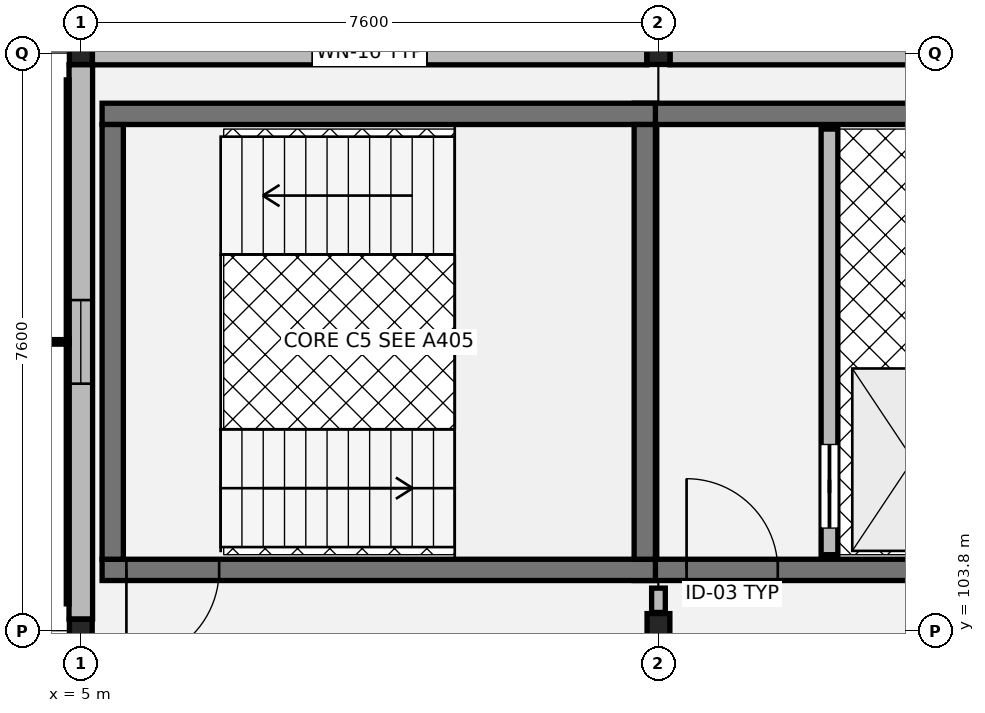
"""IFC4 building model, lengths in metres.
Left out: names, types, materials, properties, quantities, classifications, styles, units other than length and angle.
Written with IfcOpenShell. Run it as: python <this file> out.ifc"""

import sys

from ifc_helpers import new_model, si_unit, direction, frame, frame_2d, origin, origin_2d, place, context, subcontext, project, spatial, rectangle, hollow_rectangle, i_section, extrude, element, fill, save


model = new_model("IFC4")
c1 = context("Model", 3, precision=1e-05, world=origin(), true_north=direction((0.0, 1.0)))
c2 = subcontext(c1, "Body", "Model", "MODEL_VIEW")
j1 = project(units=[si_unit("LENGTHUNIT", "METRE"), si_unit("PLANEANGLEUNIT", "RADIAN")], contexts=[c1])
p1 = place(None, origin())
s1 = spatial("IfcSite", under=j1, at=p1, CompositionType="ELEMENT")
p2 = place(p1, origin())
s2 = spatial("IfcBuilding", under=s1, at=p2, CompositionType="ELEMENT")
p3 = place(p2, frame((0.0, 0.0, 5.1)))
s3 = spatial("IfcBuildingStorey", under=s2, at=p3, CompositionType="ELEMENT", Elevation=5.1)
for number, where, z_axis, x_axis in (
    (1, (5.0, 103.8, 0.0), (0.0, 0.0, 1.0), (1.0, 0.0, 0.0)),
    (2, (5.0, 111.4, 0.0), (0.0, 0.0, 1.0), (1.0, 0.0, 0.0)),
):
    element("IfcColumn", number, at=place(p3, frame(where, z_axis=z_axis, x_axis=x_axis)), inside=s3, PredefinedType="COLUMN", context=c2, shape_type="SweptSolid", body=[
        extrude(hollow_rectangle(XDim=0.3, YDim=0.3, WallThickness=0.012, at=origin_2d()), origin(), (0.0, 0.0, 1.0), 4.055),
    ])
p4 = place(p3, frame((12.6, 103.8, 0.0), z_axis=(0.0, 0.0, 1.0), x_axis=(1.0, 0.0, 0.0)))
e3 = element("IfcColumn", 3, at=p4, inside=s3, PredefinedType="COLUMN", context=c2, shape_type="SweptSolid", body=[
    extrude(i_section(OverallWidth=0.3, OverallDepth=0.45, WebThickness=0.014, FlangeThickness=0.026, at=origin_2d()), origin(), (0.0, 0.0, 1.0), 4.055),
])
p5 = place(p3, frame((12.6, 111.4, 0.0), z_axis=(0.0, 0.0, 1.0), x_axis=(1.0, 0.0, 0.0)))
e4 = element("IfcColumn", 4, at=p5, inside=s3, PredefinedType="COLUMN", context=c2, shape_type="SweptSolid", body=[
    extrude(hollow_rectangle(XDim=0.3, YDim=0.3, WallThickness=0.012, at=origin_2d()), origin(), (0.0, 0.0, 1.0), 4.055),
])
p6 = place(p3, frame((20.047, 111.4, 0.0), z_axis=(0.0, 0.0, 1.0), x_axis=(-1.0, 0.0, 0.0)))
e5 = element("IfcWall", 5, at=p6, inside=s3, PredefinedType="SOLIDWALL", context=c2, shape_type="SweptSolid", body=[
    extrude(rectangle(XDim=7.294, YDim=0.31, at=frame_2d((3.647, 0.0))), origin(), (0.0, 0.0, 1.0), 3.48),
])
p7 = place(p3, frame((12.447, 111.4, 0.0), z_axis=(0.0, 0.0, 1.0), x_axis=(-1.0, 0.0, 0.0)))
e6 = element("IfcWall", 6, at=p7, inside=s3, PredefinedType="SOLIDWALL", context=c2, shape_type="SweptSolid", body=[
    extrude(rectangle(XDim=7.294, YDim=0.31, at=frame_2d((3.647, 0.0))), origin(), (0.0, 0.0, 1.0), 3.48),
])
p8 = place(p7, frame((2.897, 0.0, 0.8)))
e7 = element("IfcOpeningElement", 7, at=p8, cuts=e6, PredefinedType="OPENING", context=c2, shape_type="SweptSolid", body=[
    extrude(rectangle(XDim=1.5, YDim=2.18, at=frame_2d((0.75, 1.09))), frame((0.0, 0.165, 0.0), z_axis=(0.0, -1.0, 0.0), x_axis=(1.0, 0.0, 0.0)), (0.0, 0.0, 1.0), 0.33),
])
p9 = place(p3, frame((5.0, 111.247, 0.0), z_axis=(0.0, 0.0, 1.0), x_axis=(0.0, -1.0, 0.0)))
e8 = element("IfcWall", 8, at=p9, inside=s3, PredefinedType="SOLIDWALL", context=c2, shape_type="SweptSolid", body=[
    extrude(rectangle(XDim=7.294, YDim=0.31, at=frame_2d((3.647, 0.0))), origin(), (0.0, 0.0, 1.0), 2.445),
])
p10 = place(p9, frame((3.097, 0.0, 0.295)))
e9 = element("IfcOpeningElement", 9, at=p10, cuts=e8, PredefinedType="OPENING", context=c2, shape_type="SweptSolid", body=[
    extrude(rectangle(XDim=1.1, YDim=2.05, at=frame_2d((0.55, 1.025))), frame((0.0, 0.165, 0.0), z_axis=(0.0, -1.0, 0.0), x_axis=(1.0, 0.0, 0.0)), (0.0, 0.0, 1.0), 0.33),
])
p11 = place(p3, frame((12.28, 104.6, 0.0), z_axis=(0.0, 0.0, 1.0), x_axis=(1.0, 0.0, 0.0)))
e10 = element("IfcWall", 10, at=p11, inside=s3, PredefinedType="SHEAR", context=c2, shape_type="SweptSolid", body=[
    extrude(rectangle(XDim=4.96, YDim=0.28, at=frame_2d((2.48, 0.0))), origin(), (0.0, 0.0, 1.0), 3.845),
])
p12 = place(p11, frame((0.69, 0.0, 0.0)))
e11 = element("IfcOpeningElement", 11, at=p12, cuts=e10, PredefinedType="OPENING", context=c2, shape_type="SweptSolid", body=[
    extrude(rectangle(XDim=1.2, YDim=2.16, at=frame_2d((0.6, 1.08))), frame((0.0, 0.15, 0.0), z_axis=(0.0, -1.0, 0.0), x_axis=(1.0, 0.0, 0.0)), (0.0, 0.0, 1.0), 0.3),
])
p13 = place(p3, frame((17.24, 110.6, 0.0), z_axis=(0.0, 0.0, 1.0), x_axis=(-1.0, 0.0, 0.0)))
e12 = element("IfcWall", 12, at=p13, inside=s3, PredefinedType="SHEAR", context=c2, shape_type="SweptSolid", body=[
    extrude(rectangle(XDim=4.96, YDim=0.28, at=frame_2d((2.48, 0.0))), origin(), (0.0, 0.0, 1.0), 3.845),
])
p14 = place(p3, frame((14.85, 104.8, 0.0), z_axis=(0.0, 0.0, 1.0), x_axis=(0.0, 1.0, 0.0)))
e13 = element("IfcWall", 13, at=p14, inside=s3, PredefinedType="SOLIDWALL", context=c2, shape_type="SweptSolid", body=[
    extrude(rectangle(XDim=5.6, YDim=0.22, at=frame_2d((2.8, 0.0))), origin(), (0.0, 0.0, 1.0), 3.845),
])
p15 = place(p14, frame((0.35, 0.0, 0.0)))
e14 = element("IfcOpeningElement", 14, at=p15, cuts=e13, PredefinedType="OPENING", context=c2, shape_type="SweptSolid", body=[
    extrude(rectangle(XDim=1.1, YDim=2.15, at=frame_2d((0.55, 1.075))), frame((0.0, 0.12, 0.0), z_axis=(0.0, -1.0, 0.0), x_axis=(1.0, 0.0, 0.0)), (0.0, 0.0, 1.0), 0.24),
])
p16 = place(p3, frame((5.28, 104.6, 0.0), z_axis=(0.0, 0.0, 1.0), x_axis=(1.0, 0.0, 0.0)))
e15 = element("IfcWall", 15, at=p16, inside=s3, PredefinedType="SHEAR", context=c2, shape_type="SweptSolid", body=[
    extrude(rectangle(XDim=7.28, YDim=0.28, at=frame_2d((3.64, 0.0))), origin(), (0.0, 0.0, 1.0), 3.845),
])
p17 = place(p16, frame((0.32, 0.0, 0.0)))
e16 = element("IfcOpeningElement", 16, at=p17, cuts=e15, PredefinedType="OPENING", context=c2, shape_type="SweptSolid", body=[
    extrude(rectangle(XDim=1.22, YDim=2.18, at=frame_2d((0.61, 1.09))), frame((0.0, 0.15, 0.0), z_axis=(0.0, -1.0, 0.0), x_axis=(1.0, 0.0, 0.0)), (0.0, 0.0, 1.0), 0.3),
])
p18 = place(p3, frame((5.28, 110.6, 0.0), z_axis=(0.0, 0.0, 1.0), x_axis=(1.0, 0.0, 0.0)))
e17 = element("IfcWall", 17, at=p18, inside=s3, PredefinedType="SHEAR", context=c2, shape_type="SweptSolid", body=[
    extrude(rectangle(XDim=7.28, YDim=0.28, at=frame_2d((3.64, 0.0))), origin(), (0.0, 0.0, 1.0), 3.845),
])
for number, where, z_axis, x_axis in (
    (18, (5.42, 104.74, 0.0), (0.0, 0.0, 1.0), (0.0, 1.0, 0.0)),
    (19, (12.42, 104.74, 0.0), (0.0, 0.0, 1.0), (0.0, 1.0, 0.0)),
):
    element("IfcWall", number, at=place(p3, frame(where, z_axis=z_axis, x_axis=x_axis)), inside=s3, PredefinedType="SHEAR", context=c2, shape_type="SweptSolid", body=[
        extrude(rectangle(XDim=5.72, YDim=0.28, at=frame_2d((2.86, 0.0))), origin(), (0.0, 0.0, 1.0), 3.845),
    ])
p19 = place(p3, frame((12.6, 104.04, 0.0), z_axis=(0.0, 0.0, 1.0), x_axis=(0.0, 1.0, 0.0)))
e20 = element("IfcWall", 20, at=p19, inside=s3, PredefinedType="PARTITIONING", context=c2, shape_type="SweptSolid", body=[
    extrude(rectangle(XDim=0.32, YDim=0.18, at=frame_2d((0.16, 0.0))), origin(), (0.0, 0.0, 1.0), 3.18),
])
p20 = place(p8, origin())
e21 = element("IfcWindow", 21, at=p20, inside=s3, PartitioningType="SINGLE_PANEL", PredefinedType="WINDOW", context=c2, shape_type="SweptSolid", body=[
    extrude(rectangle(XDim=1.5, YDim=2.18, at=frame_2d((0.75, 1.09))), frame((0.0, 0.03, 0.0), z_axis=(0.0, -1.0, 0.0), x_axis=(1.0, 0.0, 0.0)), (0.0, 0.0, 1.0), 0.06),
])
fill(e7, e21)
p21 = place(p10, origin())
e22 = element("IfcWindow", 22, at=p21, inside=s3, PartitioningType="SINGLE_PANEL", PredefinedType="WINDOW", context=c2, shape_type="SweptSolid", body=[
    extrude(rectangle(XDim=1.1, YDim=2.05, at=frame_2d((0.55, 1.025))), frame((0.0, 0.03, 0.0), z_axis=(0.0, -1.0, 0.0), x_axis=(1.0, 0.0, 0.0)), (0.0, 0.0, 1.0), 0.06),
])
fill(e9, e22)
p22 = place(p12, origin())
e23 = element("IfcDoor", 23, at=p22, inside=s3, OperationType="SINGLE_SWING_LEFT", PredefinedType="DOOR", context=c2, shape_type="SweptSolid", body=[
    extrude(rectangle(XDim=1.2, YDim=2.16, at=frame_2d((0.6, 1.08))), frame((0.0, 0.025, 0.0), z_axis=(0.0, -1.0, 0.0), x_axis=(1.0, 0.0, 0.0)), (0.0, 0.0, 1.0), 0.05),
])
fill(e11, e23)
p23 = place(p15, origin())
e24 = element("IfcDoor", 24, at=p23, inside=s3, OperationType="SLIDING_TO_LEFT", PredefinedType="DOOR", context=c2, shape_type="SweptSolid", body=[
    extrude(rectangle(XDim=1.1, YDim=2.15, at=frame_2d((0.55, 1.075))), frame((0.0, 0.025, 0.0), z_axis=(0.0, -1.0, 0.0), x_axis=(1.0, 0.0, 0.0)), (0.0, 0.0, 1.0), 0.05),
])
fill(e14, e24)
p24 = place(p17, origin())
e25 = element("IfcDoor", 25, at=p24, inside=s3, OperationType="SINGLE_SWING_RIGHT", PredefinedType="DOOR", context=c2, shape_type="SweptSolid", body=[
    extrude(rectangle(XDim=1.22, YDim=2.18, at=frame_2d((0.61, 1.09))), frame((0.0, 0.025, 0.0), z_axis=(0.0, -1.0, 0.0), x_axis=(1.0, 0.0, 0.0)), (0.0, 0.0, 1.0), 0.05),
])
fill(e16, e25)
save(model, sys.argv[1])
